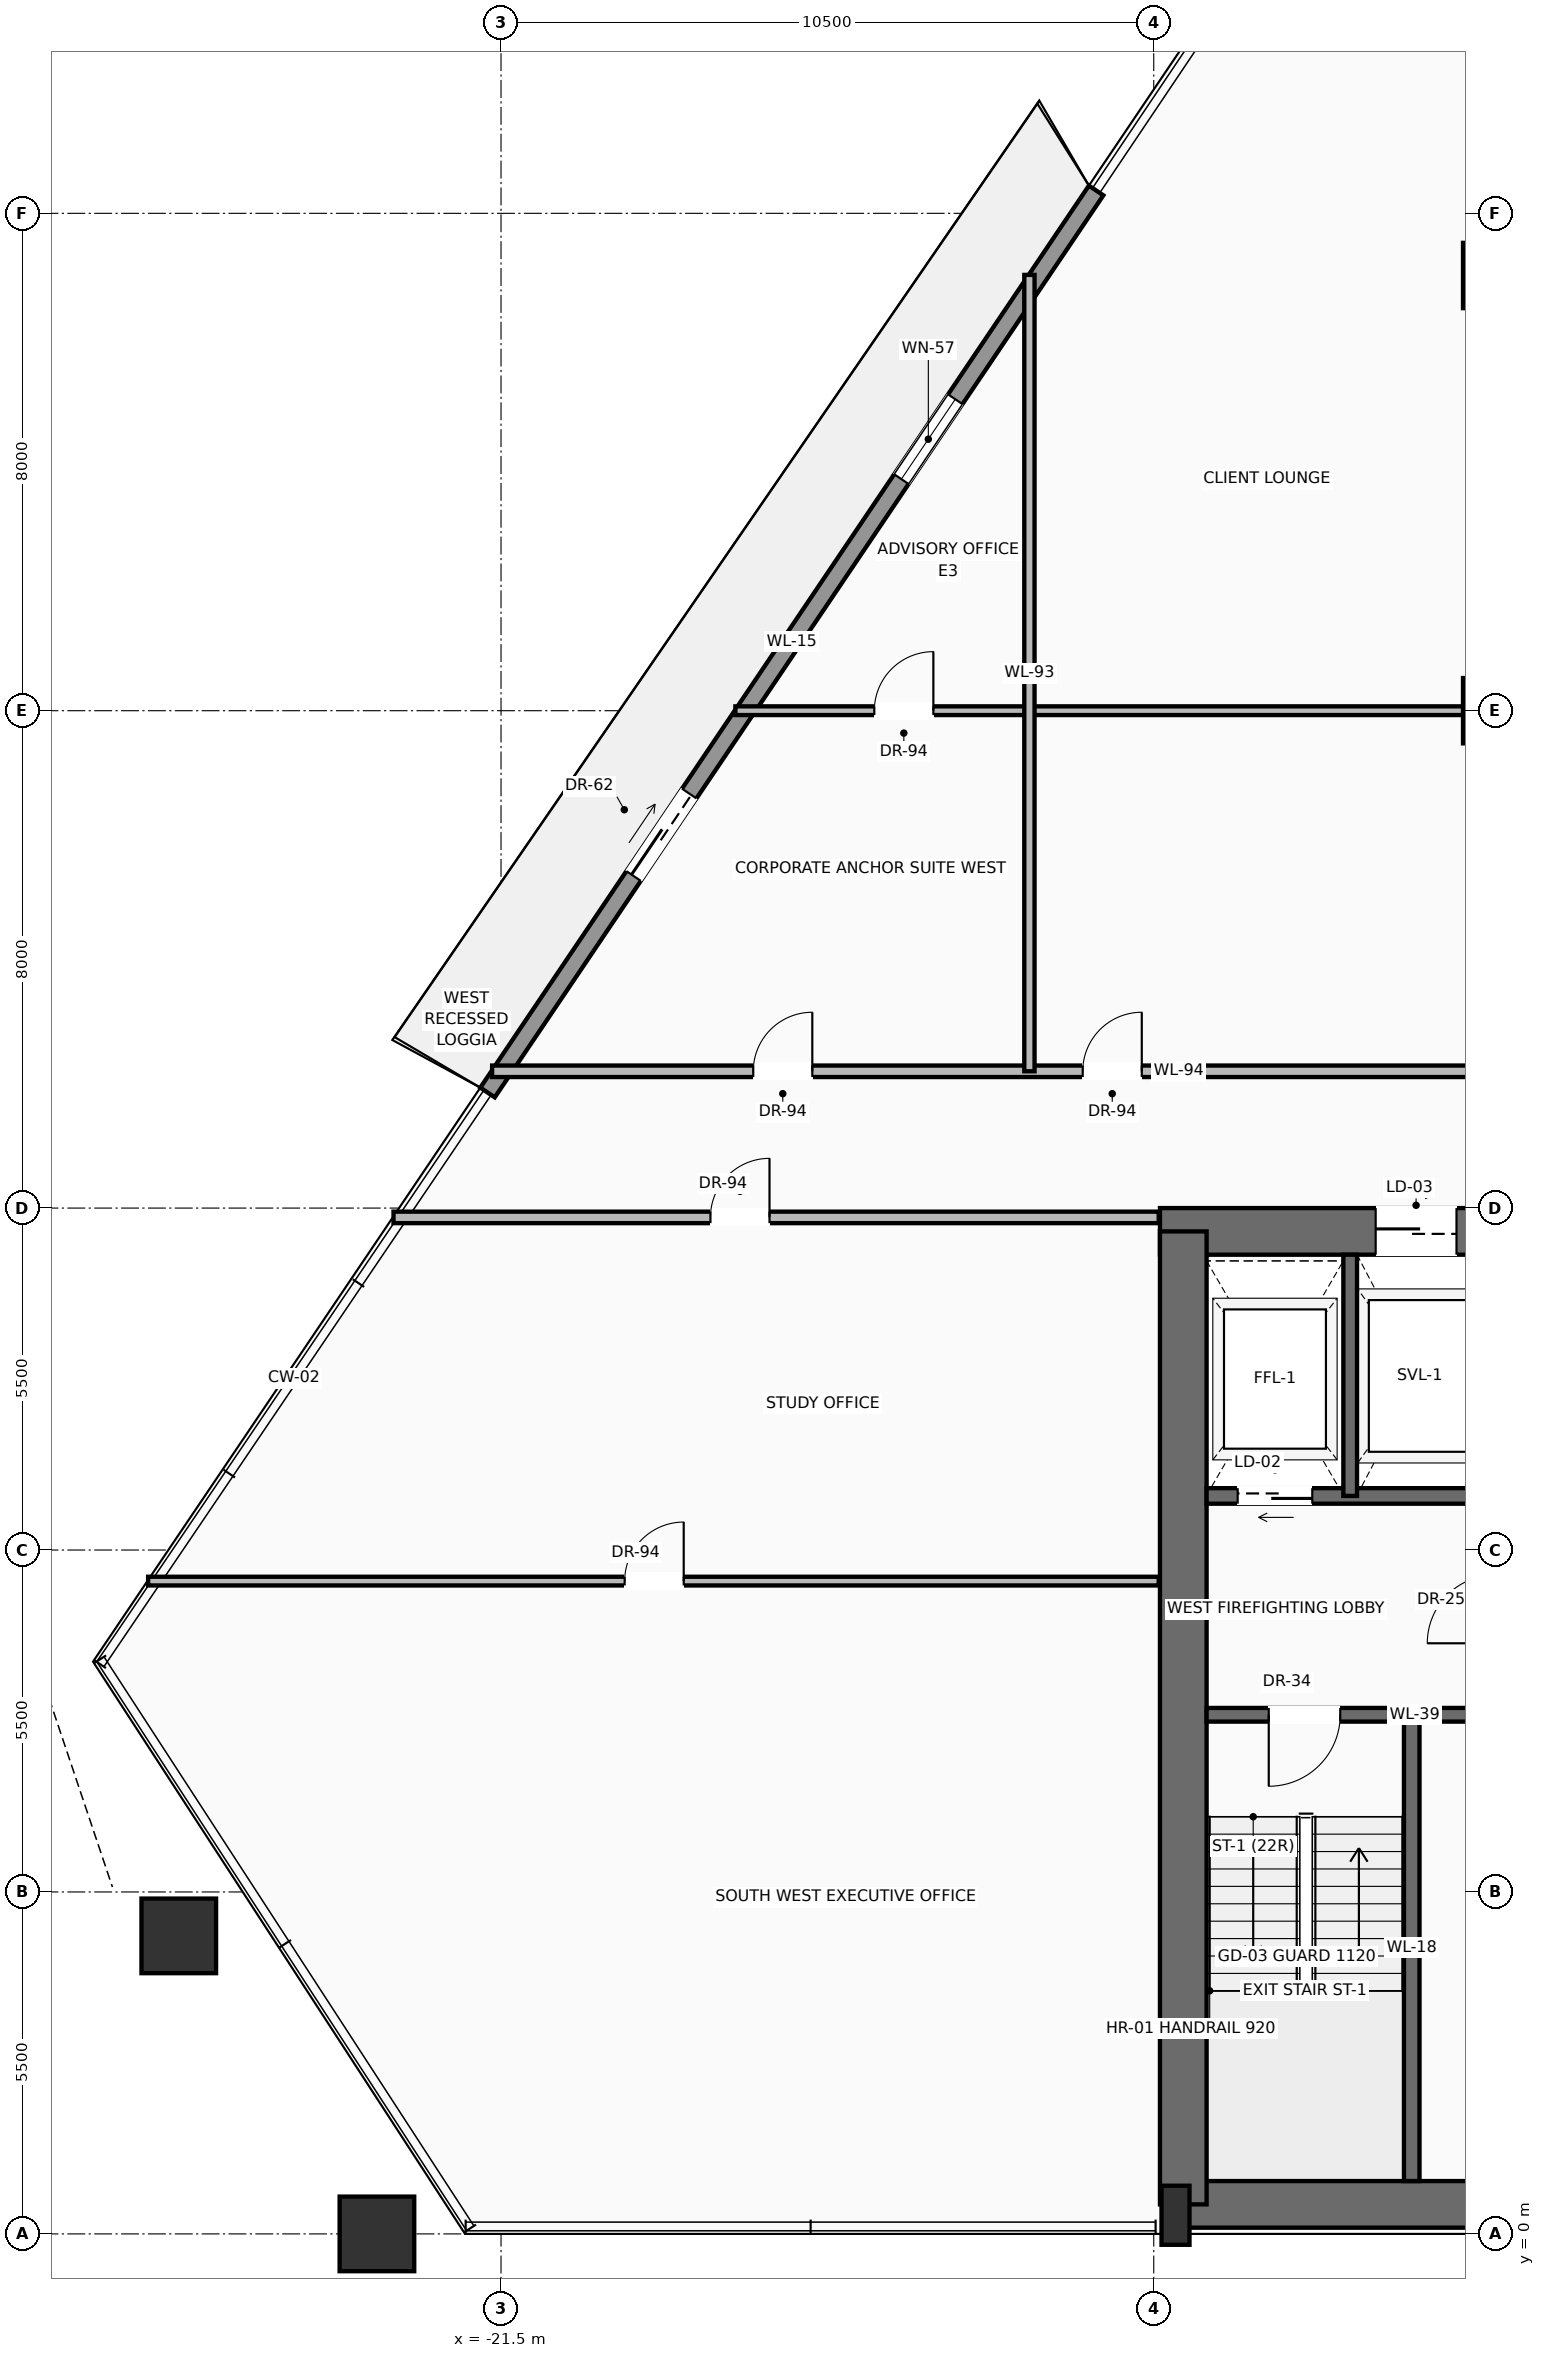
"""IFC4 building model, lengths in metres.
Left out: names, types, materials, properties, quantities, classifications, styles, units other than length and angle.
Written with IfcOpenShell. Run it as: python <this file> out.ifc"""

import sys

from ifc_helpers import new_model, si_unit, direction, frame, frame_2d, origin, origin_2d, place, context, subcontext, project, spatial, rectangle, hollow_rectangle, extrude, source, transform, mapped, element, fill, save


model = new_model("IFC4")
c1 = context("Model", 3, precision=1e-05, world=origin(), true_north=direction((0.0, 1.0)))
c2 = subcontext(c1, "Body", "Model", "MODEL_VIEW")
j1 = project(units=[si_unit("LENGTHUNIT", "METRE"), si_unit("PLANEANGLEUNIT", "RADIAN")], contexts=[c1])
p1 = place(None, origin())
s1 = spatial("IfcSite", under=j1, at=p1, CompositionType="ELEMENT")
p2 = place(p1, origin())
s2 = spatial("IfcBuilding", under=s1, at=p2, CompositionType="ELEMENT")
p3 = place(p2, frame((0.0, 0.0, 87.7)))
s3 = spatial("IfcBuildingStorey", under=s2, at=p3, CompositionType="ELEMENT", Elevation=87.7)
p4 = place(p3, frame((-10.65, 0.475, 0.0), z_axis=(0.0, 0.0, 1.0), x_axis=(1.0, 0.0, 0.0)))
e1 = element("IfcWall", 1, at=p4, inside=s3, PredefinedType="SHEAR", context=c2, shape_type="SweptSolid", body=[
    extrude(rectangle(XDim=21.3, YDim=0.75, at=frame_2d((10.65, 0.0))), origin(), (0.0, 0.0, 1.0), 3.45),
])
p5 = place(p3, frame((-10.9, 16.125, 0.0), z_axis=(0.0, 0.0, 1.0), x_axis=(1.0, 0.0, 0.0)))
e2 = element("IfcWall", 2, at=p5, inside=s3, PredefinedType="SHEAR", context=c2, shape_type="SweptSolid", body=[
    extrude(rectangle(XDim=21.8, YDim=0.75, at=frame_2d((10.9, 0.0))), origin(), (0.0, 0.0, 1.0), 3.45),
])
p6 = place(p5, frame((3.47, 0.0, 0.0)))
e3 = element("IfcOpeningElement", 3, at=p6, cuts=e2, PredefinedType="OPENING", context=c2, shape_type="SweptSolid", body=[
    extrude(rectangle(XDim=1.3, YDim=2.3, at=frame_2d((0.65, 1.15))), frame((0.0, 0.385, 0.0), z_axis=(0.0, -1.0, 0.0), x_axis=(1.0, 0.0, 0.0)), (0.0, 0.0, 1.0), 0.77),
])
p7 = place(p5, frame((9.9, 0.0, 0.0)))
e4 = element("IfcOpeningElement", 4, at=p7, cuts=e2, PredefinedType="OPENING", context=c2, shape_type="SweptSolid", body=[
    extrude(rectangle(XDim=2.0, YDim=2.4, at=frame_2d((1.0, 1.2))), frame((0.0, 0.385, 0.0), z_axis=(0.0, -1.0, 0.0), x_axis=(1.0, 0.0, 0.0)), (0.0, 0.0, 1.0), 0.77),
])
p8 = place(p3, frame((-10.525, 0.475, 0.0), z_axis=(0.0, 0.0, 1.0), x_axis=(0.0, 1.0, 0.0)))
e5 = element("IfcWall", 5, at=p8, inside=s3, PredefinedType="SHEAR", context=c2, shape_type="SweptSolid", body=[
    extrude(rectangle(XDim=15.65, YDim=0.75, at=frame_2d((7.825, 0.0))), origin(), (0.0, 0.0, 1.0), 3.45),
])
m1 = source(origin(), c2, "Body", "SweptSolid", [
    extrude(rectangle(XDim=0.45, YDim=0.95, at=origin_2d()), origin(), (0.0, 0.0, 1.0), 3.7),
])
p9 = place(p3, frame((-10.65, 0.3, 0.0), z_axis=(0.0, 0.0, 1.0), x_axis=(1.0, 0.0, 0.0)))
e6 = element("IfcColumn", 6, at=p9, inside=s3, PredefinedType="PILASTER", context=c2, shape_type="MappedRepresentation", body=[
    mapped(m1, transform((0.0, 0.0, 0.0), scale=1.0)),
])
m2 = source(origin(), c2, "Body", "SweptSolid", [
    extrude(hollow_rectangle(XDim=1.2, YDim=1.2, WallThickness=0.06, at=origin_2d()), origin(), (0.0, 0.0, 1.0), 3.692),
])
for number, where, z_axis, x_axis in (
    (7, (-23.496, 0.0, 0.004), (-0.015, 0.0, 1.0), (0.0, -1.0, 0.0)),
    (8, (-26.684, 4.794, 0.004), (-0.002, -0.017, 1.0), (0.994, -0.112, 0.0)),
):
    element("IfcColumn", number, at=place(p3, frame(where, z_axis=z_axis, x_axis=x_axis)), inside=s3, PredefinedType="COLUMN", context=c2, shape_type="MappedRepresentation", body=[
        mapped(m2, transform((0.0, 0.0, 0.0), scale=1.0)),
    ])
m3 = source(origin(), c2, "Body", "SweptSolid", [
    extrude(rectangle(XDim=1.05, YDim=1.05, at=origin_2d()), origin(), (0.0, 0.0, 1.0), 3.7),
])
for number, where, z_axis, x_axis in (
    (9, (-5.5, 24.5, 0.0), (0.0, 0.0, 1.0), (1.0, 0.0, 0.0)),
    (10, (-5.5, 31.5, 0.0), (0.0, 0.0, 1.0), (1.0, 0.0, 0.0)),
):
    element("IfcColumn", number, at=place(p3, frame(where, z_axis=z_axis, x_axis=x_axis)), inside=s3, PredefinedType="COLUMN", context=c2, shape_type="MappedRepresentation", body=[
        mapped(m3, transform((0.0, 0.0, 0.0), scale=1.0)),
    ])
p10 = place(p3, frame((-21.717, 18.359, 0.0), z_axis=(0.0, 0.0, 1.0), x_axis=(0.559343000378, 0.828936311141, 0.0)))
e11 = element("IfcWall", 11, at=p10, inside=s3, PredefinedType="SOLIDWALL", context=c2, shape_type="SweptSolid", body=[
    extrude(rectangle(XDim=17.502, YDim=0.28, at=frame_2d((8.751, 0.0))), origin(), (0.0, 0.0, 1.0), 3.03),
])
p11 = place(p10, frame((4.201, 0.0, 0.0)))
e12 = element("IfcOpeningElement", 12, at=p11, cuts=e11, PredefinedType="OPENING", context=c2, shape_type="SweptSolid", body=[
    extrude(rectangle(XDim=1.6, YDim=2.35, at=frame_2d((0.8, 1.175))), frame((0.0, 0.15, 0.0), z_axis=(0.0, -1.0, 0.0), x_axis=(1.0, 0.0, 0.0)), (0.0, 0.0, 1.0), 0.3),
])
p12 = place(p10, frame((11.902, 0.0, 0.9)))
e13 = element("IfcOpeningElement", 13, at=p12, cuts=e11, PredefinedType="OPENING", context=c2, shape_type="SweptSolid", body=[
    extrude(rectangle(XDim=1.55, YDim=1.85, at=frame_2d((0.775, 0.925))), frame((0.0, 0.15, 0.0), z_axis=(0.0, -1.0, 0.0), x_axis=(1.0, 0.0, 0.0)), (0.0, 0.0, 1.0), 0.3),
])
p13 = place(p3, frame((-6.85, 0.85, 0.0), z_axis=(0.0, 0.0, 1.0), x_axis=(0.0, 1.0, 0.0)))
e14 = element("IfcWall", 14, at=p13, inside=s3, PredefinedType="SOLIDWALL", context=c2, shape_type="SweptSolid", body=[
    extrude(rectangle(XDim=7.5, YDim=0.25, at=frame_2d((3.75, 0.0))), origin(), (0.0, 0.0, 1.0), 3.45),
])
p14 = place(p3, frame((-5.5, 8.35, 0.0), z_axis=(0.0, 0.0, 1.0), x_axis=(-1.0, 0.0, 0.0)))
e15 = element("IfcWall", 15, at=p14, inside=s3, PredefinedType="SOLIDWALL", context=c2, shape_type="SweptSolid", body=[
    extrude(rectangle(XDim=4.65, YDim=0.22, at=frame_2d((2.325, 0.0))), origin(), (0.0, 0.0, 1.0), 3.45),
])
p15 = place(p14, frame((2.5, 0.0, 0.0)))
e16 = element("IfcOpeningElement", 16, at=p15, cuts=e15, PredefinedType="OPENING", context=c2, shape_type="SweptSolid", body=[
    extrude(rectangle(XDim=1.15, YDim=2.2, at=frame_2d((0.575, 1.1))), frame((0.0, 0.12, 0.0), z_axis=(0.0, -1.0, 0.0), x_axis=(1.0, 0.0, 0.0)), (0.0, 0.0, 1.0), 0.24),
])
p16 = place(p3, frame((-5.5, 11.87, 0.0), z_axis=(0.0, 0.0, 1.0), x_axis=(-1.0, 0.0, 0.0)))
e17 = element("IfcWall", 17, at=p16, inside=s3, PredefinedType="SOLIDWALL", context=c2, shape_type="SweptSolid", body=[
    extrude(rectangle(XDim=4.65, YDim=0.25, at=frame_2d((2.325, 0.0))), origin(), (0.0, 0.0, 1.0), 3.45),
])
p17 = place(p16, frame((2.95, 0.0, 0.0)))
e18 = element("IfcOpeningElement", 18, at=p17, cuts=e17, PredefinedType="OPENING", context=c2, shape_type="SweptSolid", body=[
    extrude(rectangle(XDim=1.2, YDim=2.25, at=frame_2d((0.6, 1.125))), frame((0.0, 0.135, 0.0), z_axis=(0.0, -1.0, 0.0), x_axis=(1.0, 0.0, 0.0)), (0.0, 0.0, 1.0), 0.27),
])
p18 = place(p3, frame((-7.84, 11.87, 0.0), z_axis=(0.0, 0.0, 1.0), x_axis=(0.0, 1.0, 0.0)))
e19 = element("IfcWall", 19, at=p18, inside=s3, PredefinedType="SOLIDWALL", context=c2, shape_type="SweptSolid", body=[
    extrude(rectangle(XDim=3.88, YDim=0.22, at=frame_2d((1.94, 0.0))), origin(), (0.0, 0.0, 1.0), 3.45),
])
p19 = place(p3, frame((-23.229, 16.35, 0.0), z_axis=(0.0, 0.0, 1.0), x_axis=(1.0, 0.0, 0.0)))
e20 = element("IfcWall", 20, at=p19, inside=s3, PredefinedType="PARTITIONING", context=c2, shape_type="SweptSolid", body=[
    extrude(rectangle(XDim=12.31, YDim=0.185, at=frame_2d((6.155, 0.0))), origin(), (0.0, 0.0, 1.0), 2.747),
])
p20 = place(p19, frame((5.098, 0.0, 0.0)))
e21 = element("IfcOpeningElement", 21, at=p20, cuts=e20, PredefinedType="OPENING", context=c2, shape_type="SweptSolid", body=[
    extrude(rectangle(XDim=0.95, YDim=2.2, at=frame_2d((0.475, 1.1))), frame((0.0, 0.103, 0.0), z_axis=(0.0, -1.0, 0.0), x_axis=(1.0, 0.0, 0.0)), (0.0, 0.0, 1.0), 0.205),
])
p21 = place(p3, frame((-21.644, 18.7, 0.0), z_axis=(0.0, 0.0, 1.0), x_axis=(1.0, 0.0, 0.0)))
e22 = element("IfcWall", 22, at=p21, inside=s3, PredefinedType="PARTITIONING", context=c2, shape_type="SweptSolid", body=[
    extrude(rectangle(XDim=22.094, YDim=0.185, at=frame_2d((11.047, 0.0))), origin(), (0.0, 0.0, 1.0), 2.747),
])
p22 = place(p21, frame((9.501, 0.0, 0.0)))
e23 = element("IfcOpeningElement", 23, at=p22, cuts=e22, PredefinedType="OPENING", context=c2, shape_type="SweptSolid", body=[
    extrude(rectangle(XDim=0.95, YDim=2.2, at=frame_2d((0.475, 1.1))), frame((0.0, 0.103, 0.0), z_axis=(0.0, -1.0, 0.0), x_axis=(1.0, 0.0, 0.0)), (0.0, 0.0, 1.0), 0.205),
])
p23 = place(p21, frame((4.201, 0.0, 0.0)))
e24 = element("IfcOpeningElement", 24, at=p23, cuts=e22, PredefinedType="OPENING", context=c2, shape_type="SweptSolid", body=[
    extrude(rectangle(XDim=0.95, YDim=2.2, at=frame_2d((0.475, 1.1))), frame((0.0, 0.103, 0.0), z_axis=(0.0, -1.0, 0.0), x_axis=(1.0, 0.0, 0.0)), (0.0, 0.0, 1.0), 0.205),
])
p24 = place(p3, frame((-17.73, 24.5, 0.0), z_axis=(0.0, 0.0, 1.0), x_axis=(1.0, 0.0, 0.0)))
e25 = element("IfcWall", 25, at=p24, inside=s3, PredefinedType="PARTITIONING", context=c2, shape_type="SweptSolid", body=[
    extrude(rectangle(XDim=12.23, YDim=0.14, at=frame_2d((6.115, 0.0))), origin(), (0.0, 0.0, 1.0), 2.747),
])
p25 = place(p24, frame((2.235, 0.0, 0.0)))
e26 = element("IfcOpeningElement", 26, at=p25, cuts=e25, PredefinedType="OPENING", context=c2, shape_type="SweptSolid", body=[
    extrude(rectangle(XDim=0.95, YDim=2.2, at=frame_2d((0.475, 1.1))), frame((0.0, 0.08, 0.0), z_axis=(0.0, -1.0, 0.0), x_axis=(1.0, 0.0, 0.0)), (0.0, 0.0, 1.0), 0.16),
])
p26 = place(p3, frame((-13.0, 18.7, 0.0), z_axis=(0.0, 0.0, 1.0), x_axis=(0.0, 1.0, 0.0)))
e27 = element("IfcWall", 27, at=p26, inside=s3, PredefinedType="PARTITIONING", context=c2, shape_type="SweptSolid", body=[
    extrude(rectangle(XDim=12.81, YDim=0.165, at=frame_2d((6.405, 0.0))), origin(), (0.0, 0.0, 1.0), 2.747),
])
p27 = place(p3, frame((-27.177, 10.5, 0.0), z_axis=(0.0, 0.0, 1.0), x_axis=(1.0, 0.0, 0.0)))
e28 = element("IfcWall", 28, at=p27, inside=s3, PredefinedType="PARTITIONING", context=c2, shape_type="SweptSolid", body=[
    extrude(rectangle(XDim=16.257, YDim=0.14, at=frame_2d((8.128, 0.0))), origin(), (0.0, 0.0, 1.0), 3.442),
])
p28 = place(p27, frame((7.666, 0.0, 0.0)))
e29 = element("IfcOpeningElement", 29, at=p28, cuts=e28, PredefinedType="OPENING", context=c2, shape_type="SweptSolid", body=[
    extrude(rectangle(XDim=0.95, YDim=2.2, at=frame_2d((0.475, 1.1))), frame((0.0, 0.08, 0.0), z_axis=(0.0, -1.0, 0.0), x_axis=(1.0, 0.0, 0.0)), (0.0, 0.0, 1.0), 0.16),
])
m4 = source(origin(), c2, "Body", "SweptSolid", [
    extrude(rectangle(XDim=1.6, YDim=2.35, at=frame_2d((0.8, 1.175))), frame((0.0, 0.025, 0.0), z_axis=(0.0, -1.0, 0.0), x_axis=(1.0, 0.0, 0.0)), (0.0, 0.0, 1.0), 0.05),
])
p29 = place(p11, origin())
e30 = element("IfcDoor", 30, at=p29, inside=s3, OperationType="SLIDING_TO_LEFT", PredefinedType="DOOR", context=c2, shape_type="MappedRepresentation", body=[
    mapped(m4, transform((0.0, 0.0, 0.0), scale=1.0)),
])
fill(e12, e30)
m5 = source(origin(), c2, "Body", "SweptSolid", [
    extrude(rectangle(XDim=1.55, YDim=1.85, at=frame_2d((0.775, 0.925))), frame((0.0, 0.03, 0.0), z_axis=(0.0, -1.0, 0.0), x_axis=(1.0, 0.0, 0.0)), (0.0, 0.0, 1.0), 0.06),
])
p30 = place(p12, origin())
e31 = element("IfcWindow", 31, at=p30, inside=s3, PartitioningType="SINGLE_PANEL", PredefinedType="WINDOW", context=c2, shape_type="MappedRepresentation", body=[
    mapped(m5, transform((0.0, 0.0, 0.0), scale=1.0)),
])
fill(e13, e31)
m6 = source(origin(), c2, "Body", "SweptSolid", [
    extrude(rectangle(XDim=1.15, YDim=2.2, at=frame_2d((0.575, 1.1))), frame((0.0, 0.025, 0.0), z_axis=(0.0, -1.0, 0.0), x_axis=(1.0, 0.0, 0.0)), (0.0, 0.0, 1.0), 0.05),
])
p31 = place(p15, origin())
e32 = element("IfcDoor", 32, at=p31, inside=s3, OperationType="SINGLE_SWING_RIGHT", PredefinedType="DOOR", context=c2, shape_type="MappedRepresentation", body=[
    mapped(m6, transform((0.0, 0.0, 0.0), scale=1.0)),
])
fill(e16, e32)
m7 = source(origin(), c2, "Body", "SweptSolid", [
    extrude(rectangle(XDim=1.2, YDim=2.25, at=frame_2d((0.6, 1.125))), frame((0.0, 0.025, 0.0), z_axis=(0.0, -1.0, 0.0), x_axis=(1.0, 0.0, 0.0)), (0.0, 0.0, 1.0), 0.05),
])
p32 = place(p17, origin())
e33 = element("IfcDoor", 33, at=p32, inside=s3, OperationType="SLIDING_TO_LEFT", PredefinedType="DOOR", context=c2, shape_type="MappedRepresentation", body=[
    mapped(m7, transform((0.0, 0.0, 0.0), scale=1.0)),
])
fill(e18, e33)
m8 = source(origin(), c2, "Body", "SweptSolid", [
    extrude(rectangle(XDim=1.3, YDim=2.3, at=frame_2d((0.65, 1.15))), frame((0.0, 0.025, 0.0), z_axis=(0.0, -1.0, 0.0), x_axis=(1.0, 0.0, 0.0)), (0.0, 0.0, 1.0), 0.05),
])
p33 = place(p6, origin())
e34 = element("IfcDoor", 34, at=p33, inside=s3, OperationType="SLIDING_TO_RIGHT", PredefinedType="DOOR", context=c2, shape_type="MappedRepresentation", body=[
    mapped(m8, transform((0.0, 0.0, 0.0), scale=1.0)),
])
fill(e3, e34)
m9 = source(origin(), c2, "Body", "SweptSolid", [
    extrude(rectangle(XDim=0.95, YDim=2.2, at=frame_2d((0.475, 1.1))), frame((0.0, 0.025, 0.0), z_axis=(0.0, -1.0, 0.0), x_axis=(1.0, 0.0, 0.0)), (0.0, 0.0, 1.0), 0.05),
])
p34 = place(p20, origin())
e35 = element("IfcDoor", 35, at=p34, inside=s3, OperationType="SINGLE_SWING_RIGHT", PredefinedType="DOOR", context=c2, shape_type="MappedRepresentation", body=[
    mapped(m9, transform((0.0, 0.0, 0.0), scale=1.0)),
])
fill(e21, e35)
p35 = place(p22, origin())
e36 = element("IfcDoor", 36, at=p35, inside=s3, OperationType="SINGLE_SWING_RIGHT", PredefinedType="DOOR", context=c2, shape_type="MappedRepresentation", body=[
    mapped(m9, transform((0.0, 0.0, 0.0), scale=1.0)),
])
fill(e23, e36)
p36 = place(p28, origin())
e37 = element("IfcDoor", 37, at=p36, inside=s3, OperationType="SINGLE_SWING_RIGHT", PredefinedType="DOOR", context=c2, shape_type="MappedRepresentation", body=[
    mapped(m9, transform((0.0, 0.0, 0.0), scale=1.0)),
])
fill(e29, e37)
p37 = place(p23, origin())
e38 = element("IfcDoor", 38, at=p37, inside=s3, OperationType="SINGLE_SWING_RIGHT", PredefinedType="DOOR", context=c2, shape_type="MappedRepresentation", body=[
    mapped(m9, transform((0.0, 0.0, 0.0), scale=1.0)),
])
fill(e24, e38)
p38 = place(p25, origin())
e39 = element("IfcDoor", 39, at=p38, inside=s3, OperationType="SINGLE_SWING_RIGHT", PredefinedType="DOOR", context=c2, shape_type="MappedRepresentation", body=[
    mapped(m9, transform((0.0, 0.0, 0.0), scale=1.0)),
])
fill(e26, e39)
save(model, sys.argv[1])
